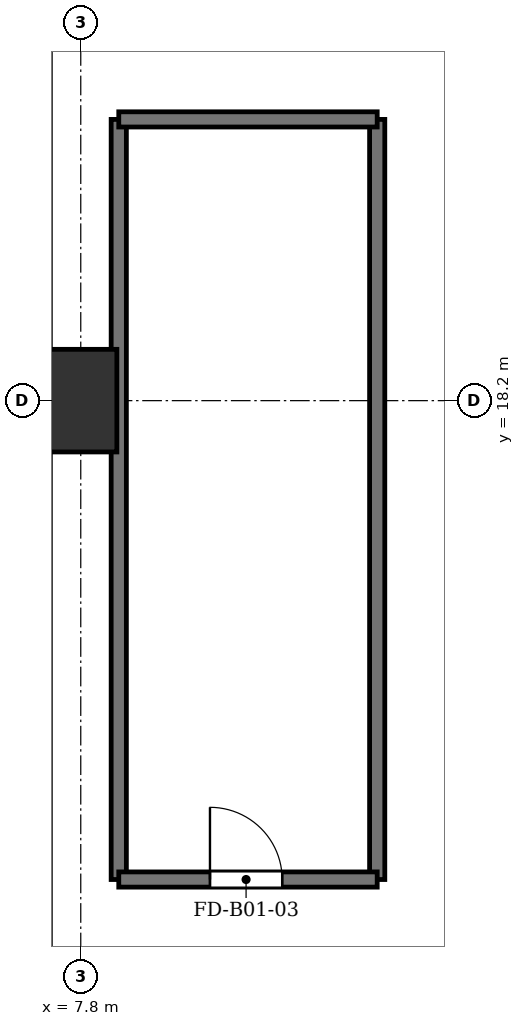
"""IFC4 building model, lengths in metres.
Left out: names, types, materials, properties, quantities, classifications, styles, units other than length and angle.
Written with IfcOpenShell. Run it as: python <this file> out.ifc"""

import sys

from ifc_helpers import new_model, si_unit, direction, frame, frame_2d, origin, origin_2d, place, context, subcontext, project, spatial, rectangle, extrude, source, transform, mapped, element, fill, save


model = new_model("IFC4")
c1 = context("Model", 3, precision=1e-05, world=origin(), true_north=direction((0.0, 1.0)))
c2 = subcontext(c1, "Body", "Model", "MODEL_VIEW")
j1 = project(units=[si_unit("LENGTHUNIT", "METRE"), si_unit("PLANEANGLEUNIT", "RADIAN")], contexts=[c1])
p1 = place(None, origin())
s1 = spatial("IfcSite", under=j1, at=p1, CompositionType="ELEMENT")
p2 = place(p1, origin())
s2 = spatial("IfcBuilding", under=s1, at=p2, CompositionType="ELEMENT")
p3 = place(p2, frame((0.0, 0.0, -4.3)))
s3 = spatial("IfcBuildingStorey", under=s2, at=p3, CompositionType="ELEMENT", Elevation=-4.3)
m1 = source(origin(), c2, "Body", "SweptSolid", [
    extrude(rectangle(XDim=1.35, YDim=1.35, at=origin_2d()), origin(), (0.0, 0.0, 1.0), 4.3),
])
p4 = place(p3, frame((7.6, 18.2, 0.0), z_axis=(0.0, 0.0, 1.0), x_axis=(1.0, 0.0, 0.0)))
e1 = element("IfcColumn", 1, at=p4, inside=s3, PredefinedType="COLUMN", context=c2, shape_type="MappedRepresentation", body=[
    mapped(m1, transform((0.0, 0.0, 0.0), x_axis=(1.0, 0.0, 0.0), y_axis=(0.0, 1.0, 0.0), z_axis=(0.0, 0.0, 1.0), scale=1.0)),
])
for number, where, z_axis, x_axis in (
    (2, (8.3, 11.9, 0.0), (0.0, 0.0, 1.0), (0.0, 1.0, 0.0)),
    (3, (11.7, 11.9, 0.0), (0.0, 0.0, 1.0), (0.0, 1.0, 0.0)),
):
    element("IfcWall", number, at=place(p3, frame(where, z_axis=z_axis, x_axis=x_axis)), inside=s3, PredefinedType="SHEAR", context=c2, shape_type="SweptSolid", body=[
        extrude(rectangle(XDim=10.0, YDim=0.2, at=frame_2d((5.0, 0.0))), origin(), (0.0, 0.0, 1.0), 3.94),
    ])
p5 = place(p3, frame((8.3, 11.9, 0.0), z_axis=(0.0, 0.0, 1.0), x_axis=(1.0, 0.0, 0.0)))
e4 = element("IfcWall", 4, at=p5, inside=s3, PredefinedType="SHEAR", context=c2, shape_type="SweptSolid", body=[
    extrude(rectangle(XDim=3.4, YDim=0.2, at=frame_2d((1.7, 0.0))), origin(), (0.0, 0.0, 1.0), 3.94),
])
p6 = place(p5, frame((1.2, 0.0, 0.0)))
e5 = element("IfcOpeningElement", 5, at=p6, cuts=e4, PredefinedType="OPENING", context=c2, shape_type="SweptSolid", body=[
    extrude(rectangle(XDim=0.95, YDim=2.15, at=frame_2d((0.475, 1.075))), frame((0.0, 0.11, 0.0), z_axis=(0.0, -1.0, 0.0), x_axis=(1.0, 0.0, 0.0)), (0.0, 0.0, 1.0), 0.22),
])
p7 = place(p3, frame((8.3, 21.9, 0.0), z_axis=(0.0, 0.0, 1.0), x_axis=(1.0, 0.0, 0.0)))
e6 = element("IfcWall", 6, at=p7, inside=s3, PredefinedType="SHEAR", context=c2, shape_type="SweptSolid", body=[
    extrude(rectangle(XDim=3.4, YDim=0.2, at=frame_2d((1.7, 0.0))), origin(), (0.0, 0.0, 1.0), 3.94),
])
m2 = source(origin(), c2, "Body", "SweptSolid", [
    extrude(rectangle(XDim=0.95, YDim=2.15, at=frame_2d((0.475, 1.075))), frame((0.0, 0.025, 0.0), z_axis=(0.0, -1.0, 0.0), x_axis=(1.0, 0.0, 0.0)), (0.0, 0.0, 1.0), 0.05),
])
p8 = place(p6, origin())
e7 = element("IfcDoor", 7, at=p8, inside=s3, OperationType="SINGLE_SWING_LEFT", PredefinedType="DOOR", context=c2, shape_type="MappedRepresentation", body=[
    mapped(m2, transform((0.0, 0.0, 0.0), x_axis=(1.0, 0.0, 0.0), y_axis=(0.0, 1.0, 0.0), z_axis=(0.0, 0.0, 1.0), scale=1.0)),
])
fill(e5, e7)
save(model, sys.argv[1])
